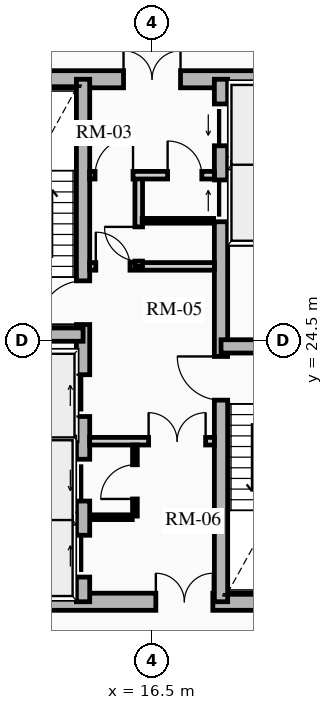
"""IFC4 building model, lengths in metres.
Left out: names, types, materials, properties, quantities, classifications, styles, units other than length and angle.
Written with IfcOpenShell. Run it as: python <this file> out.ifc"""

import sys

from ifc_helpers import new_model, si_unit, direction, frame, frame_2d, origin, place, context, subcontext, project, spatial, rectangle, extrude, source, transform, mapped, element, fill, save


model = new_model("IFC4")
c1 = context("Model", 3, precision=1e-05, world=origin(), true_north=direction((0.0, 1.0)))
c2 = subcontext(c1, "Body", "Model", "MODEL_VIEW")
j1 = project(units=[si_unit("LENGTHUNIT", "METRE"), si_unit("PLANEANGLEUNIT", "RADIAN")], contexts=[c1])
p1 = place(None, origin())
s1 = spatial("IfcSite", under=j1, at=p1, CompositionType="ELEMENT")
p2 = place(p1, origin())
s2 = spatial("IfcBuilding", under=s1, at=p2, CompositionType="ELEMENT")
p3 = place(p2, frame((0.0, 0.0, 129.16)))
s3 = spatial("IfcBuildingStorey", under=s2, at=p3, CompositionType="ELEMENT", Elevation=129.16)
p4 = place(p3, frame((11.15, 17.625, 0.0), z_axis=(0.0, 0.0, 1.0), x_axis=(1.0, 0.0, 0.0)))
e1 = element("IfcWall", 1, at=p4, inside=s3, PredefinedType="SHEAR", context=c2, shape_type="SweptSolid", body=[
    extrude(rectangle(XDim=10.7, YDim=0.45, at=frame_2d((5.35, 0.0))), origin(), (0.0, 0.0, 1.0), 3.72),
])
m1 = source(origin(), c2, "Body", "SweptSolid", [
    extrude(rectangle(XDim=1.5, YDim=2.02, at=frame_2d((0.75, 1.01))), frame((0.0, 0.235, 0.0), z_axis=(0.0, -1.0, 0.0), x_axis=(1.0, 0.0, 0.0)), (0.0, 0.0, 1.0), 0.47),
])
p5 = place(p4, frame((5.45, 0.0, 0.0)))
e2 = element("IfcOpeningElement", 2, at=p5, cuts=e1, PredefinedType="OPENING", context=c2, shape_type="MappedRepresentation", body=[
    mapped(m1, transform((0.0, 0.0, 0.0), x_axis=(1.0, 0.0, 0.0), y_axis=(0.0, 1.0, 0.0), z_axis=(0.0, 0.0, 1.0), scale=1.0)),
])
p6 = place(p3, frame((11.15, 31.375, 0.0), z_axis=(0.0, 0.0, 1.0), x_axis=(1.0, 0.0, 0.0)))
e3 = element("IfcWall", 3, at=p6, inside=s3, PredefinedType="SHEAR", context=c2, shape_type="SweptSolid", body=[
    extrude(rectangle(XDim=10.7, YDim=0.45, at=frame_2d((5.35, 0.0))), origin(), (0.0, 0.0, 1.0), 3.72),
])
p7 = place(p6, frame((4.6, 0.0, 0.0)))
e4 = element("IfcOpeningElement", 4, at=p7, cuts=e3, PredefinedType="OPENING", context=c2, shape_type="MappedRepresentation", body=[
    mapped(m1, transform((0.0, 0.0, 0.0), x_axis=(1.0, 0.0, 0.0), y_axis=(0.0, 1.0, 0.0), z_axis=(0.0, 0.0, 1.0), scale=1.0)),
])
p8 = place(p3, frame((14.685, 17.625, 0.0), z_axis=(0.0, 0.0, 1.0), x_axis=(0.0, 1.0, 0.0)))
e5 = element("IfcWall", 5, at=p8, inside=s3, PredefinedType="SHEAR", context=c2, shape_type="SweptSolid", body=[
    extrude(rectangle(XDim=13.75, YDim=0.35, at=frame_2d((6.875, 0.0))), origin(), (0.0, 0.0, 1.0), 3.72),
])
m2 = source(origin(), c2, "Body", "SweptSolid", [
    extrude(rectangle(XDim=1.1, YDim=2.015, at=frame_2d((0.55, 1.007))), frame((0.0, 0.185, 0.0), z_axis=(0.0, -1.0, 0.0), x_axis=(1.0, 0.0, 0.0)), (0.0, 0.0, 1.0), 0.37),
])
p9 = place(p8, frame((4.875, 0.0, 0.0)))
e6 = element("IfcOpeningElement", 6, at=p9, cuts=e5, PredefinedType="OPENING", context=c2, shape_type="MappedRepresentation", body=[
    mapped(m2, transform((0.0, 0.0, 0.0), x_axis=(1.0, 0.0, 0.0), y_axis=(0.0, 1.0, 0.0), z_axis=(0.0, 0.0, 1.0), scale=1.0)),
])
p10 = place(p8, frame((0.65, 0.0, 0.0)))
e7 = element("IfcOpeningElement", 7, at=p10, cuts=e5, PredefinedType="OPENING", context=c2, shape_type="MappedRepresentation", body=[
    mapped(m2, transform((0.0, 0.0, 0.0), x_axis=(1.0, 0.0, 0.0), y_axis=(0.0, 1.0, 0.0), z_axis=(0.0, 0.0, 1.0), scale=1.0)),
])
p11 = place(p8, frame((2.65, 0.0, 0.0)))
e8 = element("IfcOpeningElement", 8, at=p11, cuts=e5, PredefinedType="OPENING", context=c2, shape_type="MappedRepresentation", body=[
    mapped(m2, transform((0.0, 0.0, 0.0), x_axis=(1.0, 0.0, 0.0), y_axis=(0.0, 1.0, 0.0), z_axis=(0.0, 0.0, 1.0), scale=1.0)),
])
m3 = source(origin(), c2, "Body", "SweptSolid", [
    extrude(rectangle(XDim=1.15, YDim=2.02, at=frame_2d((0.575, 1.01))), frame((0.0, 0.185, 0.0), z_axis=(0.0, -1.0, 0.0), x_axis=(1.0, 0.0, 0.0)), (0.0, 0.0, 1.0), 0.37),
])
p12 = place(p8, frame((7.295, 0.0, 0.0)))
e9 = element("IfcOpeningElement", 9, at=p12, cuts=e5, PredefinedType="OPENING", context=c2, shape_type="MappedRepresentation", body=[
    mapped(m3, transform((0.0, 0.0, 0.0), x_axis=(1.0, 0.0, 0.0), y_axis=(0.0, 1.0, 0.0), z_axis=(0.0, 0.0, 1.0), scale=1.0)),
])
p13 = place(p3, frame((18.315, 17.625, 0.0), z_axis=(0.0, 0.0, 1.0), x_axis=(0.0, 1.0, 0.0)))
e10 = element("IfcWall", 10, at=p13, inside=s3, PredefinedType="SHEAR", context=c2, shape_type="SweptSolid", body=[
    extrude(rectangle(XDim=13.75, YDim=0.35, at=frame_2d((6.875, 0.0))), origin(), (0.0, 0.0, 1.0), 3.72),
])
p14 = place(p13, frame((10.0, 0.0, 0.0)))
e11 = element("IfcOpeningElement", 11, at=p14, cuts=e10, PredefinedType="OPENING", context=c2, shape_type="MappedRepresentation", body=[
    mapped(m2, transform((0.0, 0.0, 0.0), x_axis=(1.0, 0.0, 0.0), y_axis=(0.0, 1.0, 0.0), z_axis=(0.0, 0.0, 1.0), scale=1.0)),
])
p15 = place(p13, frame((12.0, 0.0, 0.0)))
e12 = element("IfcOpeningElement", 12, at=p15, cuts=e10, PredefinedType="OPENING", context=c2, shape_type="MappedRepresentation", body=[
    mapped(m2, transform((0.0, 0.0, 0.0), x_axis=(1.0, 0.0, 0.0), y_axis=(0.0, 1.0, 0.0), z_axis=(0.0, 0.0, 1.0), scale=1.0)),
])
p16 = place(p13, frame((5.305, 0.0, 0.0)))
e13 = element("IfcOpeningElement", 13, at=p16, cuts=e10, PredefinedType="OPENING", context=c2, shape_type="MappedRepresentation", body=[
    mapped(m3, transform((0.0, 0.0, 0.0), x_axis=(1.0, 0.0, 0.0), y_axis=(0.0, 1.0, 0.0), z_axis=(0.0, 0.0, 1.0), scale=1.0)),
])
for number, where, z_axis, x_axis in (
    (14, (11.4, 24.655, 0.0), (0.0, 0.0, 1.0), (1.0, 0.0, 0.0)),
    (15, (18.315, 24.345, 0.0), (0.0, 0.0, 1.0), (1.0, 0.0, 0.0)),
):
    element("IfcWall", number, at=place(p3, frame(where, z_axis=z_axis, x_axis=x_axis)), inside=s3, PredefinedType="SHEAR", context=c2, shape_type="SweptSolid", body=[
        extrude(rectangle(XDim=3.285, YDim=0.35, at=frame_2d((1.643, 0.0))), origin(), (0.0, 0.0, 1.0), 3.72),
    ])
for number, where, z_axis, x_axis in (
    (16, (11.52, 21.8, 0.0), (0.0, 0.0, 1.0), (1.0, 0.0, 0.0)),
    (17, (11.52, 19.825, 0.0), (0.0, 0.0, 1.0), (1.0, 0.0, 0.0)),
    (18, (18.51, 27.13, 0.0), (0.0, 0.0, 1.0), (1.0, 0.0, 0.0)),
    (19, (18.51, 29.175, 0.0), (0.0, 0.0, 1.0), (1.0, 0.0, 0.0)),
):
    element("IfcWall", number, at=place(p3, frame(where, z_axis=z_axis, x_axis=x_axis)), inside=s3, PredefinedType="SHEAR", context=c2, shape_type="SweptSolid", body=[
        extrude(rectangle(XDim=2.97, YDim=0.2, at=frame_2d((1.485, 0.0))), origin(), (0.0, 0.0, 1.0), 3.72),
    ])
p17 = place(p3, frame((14.86, 21.85, 0.0), z_axis=(0.0, 0.0, 1.0), x_axis=(1.0, 0.0, 0.0)))
e20 = element("IfcWall", 20, at=p17, inside=s3, PredefinedType="PARTITIONING", context=c2, shape_type="SweptSolid", body=[
    extrude(rectangle(XDim=3.28, YDim=0.2, at=frame_2d((1.64, 0.0))), origin(), (0.0, 0.0, 1.0), 3.425),
])
m4 = source(origin(), c2, "Body", "SweptSolid", [
    extrude(rectangle(XDim=1.5, YDim=2.02, at=frame_2d((0.75, 1.01))), frame((0.0, 0.11, 0.0), z_axis=(0.0, -1.0, 0.0), x_axis=(1.0, 0.0, 0.0)), (0.0, 0.0, 1.0), 0.22),
])
p18 = place(p17, frame((1.55, 0.0, 0.0)))
e21 = element("IfcOpeningElement", 21, at=p18, cuts=e20, PredefinedType="OPENING", context=c2, shape_type="MappedRepresentation", body=[
    mapped(m4, transform((0.0, 0.0, 0.0), x_axis=(1.0, 0.0, 0.0), y_axis=(0.0, 1.0, 0.0), z_axis=(0.0, 0.0, 1.0), scale=1.0)),
])
p19 = place(p3, frame((14.86, 26.45, 0.0), z_axis=(0.0, 0.0, 1.0), x_axis=(1.0, 0.0, 0.0)))
e22 = element("IfcWall", 22, at=p19, inside=s3, PredefinedType="PARTITIONING", context=c2, shape_type="SweptSolid", body=[
    extrude(rectangle(XDim=3.28, YDim=0.2, at=frame_2d((1.64, 0.0))), origin(), (0.0, 0.0, 1.0), 3.425),
])
m5 = source(origin(), c2, "Body", "SweptSolid", [
    extrude(rectangle(XDim=0.9, YDim=2.005, at=frame_2d((0.45, 1.002))), frame((0.0, 0.11, 0.0), z_axis=(0.0, -1.0, 0.0), x_axis=(1.0, 0.0, 0.0)), (0.0, 0.0, 1.0), 0.22),
])
p20 = place(p19, frame((0.16, 0.0, 0.0)))
e23 = element("IfcOpeningElement", 23, at=p20, cuts=e22, PredefinedType="OPENING", context=c2, shape_type="MappedRepresentation", body=[
    mapped(m5, transform((0.0, 0.0, 0.0), x_axis=(1.0, 0.0, 0.0), y_axis=(0.0, 1.0, 0.0), z_axis=(0.0, 0.0, 1.0), scale=1.0)),
])
p21 = place(p3, frame((16.15, 26.45, 0.0), z_axis=(0.0, 0.0, 1.0), x_axis=(0.0, 1.0, 0.0)))
e24 = element("IfcWall", 24, at=p21, inside=s3, PredefinedType="PARTITIONING", context=c2, shape_type="SweptSolid", body=[
    extrude(rectangle(XDim=2.4, YDim=0.2, at=frame_2d((1.2, 0.0))), origin(), (0.0, 0.0, 1.0), 3.425),
])
p22 = place(p21, frame((0.14, 0.0, 0.0)))
e25 = element("IfcOpeningElement", 25, at=p22, cuts=e24, PredefinedType="OPENING", context=c2, shape_type="MappedRepresentation", body=[
    mapped(m5, transform((0.0, 0.0, 0.0), x_axis=(1.0, 0.0, 0.0), y_axis=(0.0, 1.0, 0.0), z_axis=(0.0, 0.0, 1.0), scale=1.0)),
])
p23 = place(p3, frame((14.86, 28.85, 0.0), z_axis=(0.0, 0.0, 1.0), x_axis=(1.0, 0.0, 0.0)))
e26 = element("IfcWall", 26, at=p23, inside=s3, PredefinedType="PARTITIONING", context=c2, shape_type="SweptSolid", body=[
    extrude(rectangle(XDim=3.28, YDim=0.2, at=frame_2d((1.64, 0.0))), origin(), (0.0, 0.0, 1.0), 3.425),
])
m6 = source(origin(), c2, "Body", "SweptSolid", [
    extrude(rectangle(XDim=1.0, YDim=2.015, at=frame_2d((0.5, 1.007))), frame((0.0, 0.11, 0.0), z_axis=(0.0, -1.0, 0.0), x_axis=(1.0, 0.0, 0.0)), (0.0, 0.0, 1.0), 0.22),
])
p24 = place(p23, frame((0.14, 0.0, 0.0)))
e27 = element("IfcOpeningElement", 27, at=p24, cuts=e26, PredefinedType="OPENING", context=c2, shape_type="MappedRepresentation", body=[
    mapped(m6, transform((0.0, 0.0, 0.0), x_axis=(1.0, 0.0, 0.0), y_axis=(0.0, 1.0, 0.0), z_axis=(0.0, 0.0, 1.0), scale=1.0)),
])
p25 = place(p23, frame((2.05, 0.0, 0.0)))
e28 = element("IfcOpeningElement", 28, at=p25, cuts=e26, PredefinedType="OPENING", context=c2, shape_type="MappedRepresentation", body=[
    mapped(m5, transform((0.0, 0.0, 0.0), x_axis=(1.0, 0.0, 0.0), y_axis=(0.0, 1.0, 0.0), z_axis=(0.0, 0.0, 1.0), scale=1.0)),
])
p26 = place(p3, frame((16.05, 19.88, 0.0), z_axis=(0.0, 0.0, 1.0), x_axis=(0.0, 1.0, 0.0)))
e29 = element("IfcWall", 29, at=p26, inside=s3, PredefinedType="PARTITIONING", context=c2, shape_type="SweptSolid", body=[
    extrude(rectangle(XDim=1.87, YDim=0.125, at=frame_2d((0.935, 0.0))), origin(), (0.0, 0.0, 1.0), 3.425),
])
m7 = source(origin(), c2, "Body", "SweptSolid", [
    extrude(rectangle(XDim=0.9, YDim=2.005, at=frame_2d((0.45, 1.002))), frame((0.0, 0.073, 0.0), z_axis=(0.0, -1.0, 0.0), x_axis=(1.0, 0.0, 0.0)), (0.0, 0.0, 1.0), 0.145),
])
p27 = place(p26, frame((0.45, 0.0, 0.0)))
e30 = element("IfcOpeningElement", 30, at=p27, cuts=e29, PredefinedType="OPENING", context=c2, shape_type="MappedRepresentation", body=[
    mapped(m7, transform((0.0, 0.0, 0.0), x_axis=(1.0, 0.0, 0.0), y_axis=(0.0, 1.0, 0.0), z_axis=(0.0, 0.0, 1.0), scale=1.0)),
])
p28 = place(p3, frame((14.88, 19.85, 0.0), z_axis=(0.0, 0.0, 1.0), x_axis=(1.0, 0.0, 0.0)))
e31 = element("IfcWall", 31, at=p28, inside=s3, PredefinedType="PARTITIONING", context=c2, shape_type="SweptSolid", body=[
    extrude(rectangle(XDim=1.1, YDim=0.125, at=frame_2d((0.55, 0.0))), origin(), (0.0, 0.0, 1.0), 3.425),
])
p29 = place(p3, frame((16.24, 27.65, 0.0), z_axis=(0.0, 0.0, 1.0), x_axis=(1.0, 0.0, 0.0)))
e32 = element("IfcWall", 32, at=p29, inside=s3, PredefinedType="PARTITIONING", context=c2, shape_type="SweptSolid", body=[
    extrude(rectangle(XDim=1.88, YDim=0.125, at=frame_2d((0.94, 0.0))), origin(), (0.0, 0.0, 1.0), 3.425),
])
m8 = source(origin(), c2, "Body", "SweptSolid", [
    extrude(rectangle(XDim=1.1, YDim=2.015, at=frame_2d((0.55, 1.007))), frame((0.0, 0.025, 0.0), z_axis=(0.0, -1.0, 0.0), x_axis=(1.0, 0.0, 0.0)), (0.0, 0.0, 1.0), 0.05),
])
p30 = place(p9, origin())
e33 = element("IfcDoor", 33, at=p30, inside=s3, OperationType="SLIDING_TO_RIGHT", PredefinedType="DOOR", context=c2, shape_type="MappedRepresentation", body=[
    mapped(m8, transform((0.0, 0.0, 0.0), x_axis=(1.0, 0.0, 0.0), y_axis=(0.0, 1.0, 0.0), z_axis=(0.0, 0.0, 1.0), scale=1.0)),
])
fill(e6, e33)
p31 = place(p10, origin())
e34 = element("IfcDoor", 34, at=p31, inside=s3, OperationType="SLIDING_TO_RIGHT", PredefinedType="DOOR", context=c2, shape_type="MappedRepresentation", body=[
    mapped(m8, transform((0.0, 0.0, 0.0), x_axis=(1.0, 0.0, 0.0), y_axis=(0.0, 1.0, 0.0), z_axis=(0.0, 0.0, 1.0), scale=1.0)),
])
fill(e7, e34)
p32 = place(p11, origin())
e35 = element("IfcDoor", 35, at=p32, inside=s3, OperationType="SLIDING_TO_LEFT", PredefinedType="DOOR", context=c2, shape_type="MappedRepresentation", body=[
    mapped(m8, transform((0.0, 0.0, 0.0), x_axis=(1.0, 0.0, 0.0), y_axis=(0.0, 1.0, 0.0), z_axis=(0.0, 0.0, 1.0), scale=1.0)),
])
fill(e8, e35)
p33 = place(p14, origin())
e36 = element("IfcDoor", 36, at=p33, inside=s3, OperationType="SLIDING_TO_RIGHT", PredefinedType="DOOR", context=c2, shape_type="MappedRepresentation", body=[
    mapped(m8, transform((0.0, 0.0, 0.0), x_axis=(1.0, 0.0, 0.0), y_axis=(0.0, 1.0, 0.0), z_axis=(0.0, 0.0, 1.0), scale=1.0)),
])
fill(e11, e36)
p34 = place(p15, origin())
e37 = element("IfcDoor", 37, at=p34, inside=s3, OperationType="SLIDING_TO_LEFT", PredefinedType="DOOR", context=c2, shape_type="MappedRepresentation", body=[
    mapped(m8, transform((0.0, 0.0, 0.0), x_axis=(1.0, 0.0, 0.0), y_axis=(0.0, 1.0, 0.0), z_axis=(0.0, 0.0, 1.0), scale=1.0)),
])
fill(e12, e37)
m9 = source(origin(), c2, "Body", "SweptSolid", [
    extrude(rectangle(XDim=1.15, YDim=2.02, at=frame_2d((0.575, 1.01))), frame((0.0, 0.025, 0.0), z_axis=(0.0, -1.0, 0.0), x_axis=(1.0, 0.0, 0.0)), (0.0, 0.0, 1.0), 0.05),
])
p35 = place(p12, origin())
e38 = element("IfcDoor", 38, at=p35, inside=s3, OperationType="SINGLE_SWING_LEFT", PredefinedType="DOOR", context=c2, shape_type="MappedRepresentation", body=[
    mapped(m9, transform((0.0, 0.0, 0.0), x_axis=(1.0, 0.0, 0.0), y_axis=(0.0, 1.0, 0.0), z_axis=(0.0, 0.0, 1.0), scale=1.0)),
])
fill(e9, e38)
p36 = place(p16, origin())
e39 = element("IfcDoor", 39, at=p36, inside=s3, OperationType="SINGLE_SWING_RIGHT", PredefinedType="DOOR", context=c2, shape_type="MappedRepresentation", body=[
    mapped(m9, transform((0.0, 0.0, 0.0), x_axis=(1.0, 0.0, 0.0), y_axis=(0.0, 1.0, 0.0), z_axis=(0.0, 0.0, 1.0), scale=1.0)),
])
fill(e13, e39)
m10 = source(origin(), c2, "Body", "SweptSolid", [
    extrude(rectangle(XDim=1.5, YDim=2.02, at=frame_2d((0.75, 1.01))), frame((0.0, 0.025, 0.0), z_axis=(0.0, -1.0, 0.0), x_axis=(1.0, 0.0, 0.0)), (0.0, 0.0, 1.0), 0.05),
])
p37 = place(p7, origin())
e40 = element("IfcDoor", 40, at=p37, inside=s3, OperationType="DOUBLE_DOOR_SINGLE_SWING", PredefinedType="DOOR", context=c2, shape_type="MappedRepresentation", body=[
    mapped(m10, transform((0.0, 0.0, 0.0), x_axis=(1.0, 0.0, 0.0), y_axis=(0.0, 1.0, 0.0), z_axis=(0.0, 0.0, 1.0), scale=1.0)),
])
fill(e4, e40)
p38 = place(p5, origin())
e41 = element("IfcDoor", 41, at=p38, inside=s3, OperationType="DOUBLE_DOOR_SINGLE_SWING", PredefinedType="DOOR", context=c2, shape_type="MappedRepresentation", body=[
    mapped(m10, transform((0.0, 0.0, 0.0), x_axis=(1.0, 0.0, 0.0), y_axis=(0.0, 1.0, 0.0), z_axis=(0.0, 0.0, 1.0), scale=1.0)),
])
fill(e2, e41)
p39 = place(p18, origin())
e42 = element("IfcDoor", 42, at=p39, inside=s3, OperationType="DOUBLE_DOOR_SINGLE_SWING", PredefinedType="DOOR", context=c2, shape_type="MappedRepresentation", body=[
    mapped(m10, transform((0.0, 0.0, 0.0), x_axis=(1.0, 0.0, 0.0), y_axis=(0.0, 1.0, 0.0), z_axis=(0.0, 0.0, 1.0), scale=1.0)),
])
fill(e21, e42)
m11 = source(origin(), c2, "Body", "SweptSolid", [
    extrude(rectangle(XDim=0.9, YDim=2.005, at=frame_2d((0.45, 1.002))), frame((0.0, 0.025, 0.0), z_axis=(0.0, -1.0, 0.0), x_axis=(1.0, 0.0, 0.0)), (0.0, 0.0, 1.0), 0.05),
])
p40 = place(p20, origin())
e43 = element("IfcDoor", 43, at=p40, inside=s3, OperationType="SINGLE_SWING_LEFT", PredefinedType="DOOR", context=c2, shape_type="MappedRepresentation", body=[
    mapped(m11, transform((0.0, 0.0, 0.0), x_axis=(1.0, 0.0, 0.0), y_axis=(0.0, 1.0, 0.0), z_axis=(0.0, 0.0, 1.0), scale=1.0)),
])
fill(e23, e43)
m12 = source(origin(), c2, "Body", "SweptSolid", [
    extrude(rectangle(XDim=1.0, YDim=2.015, at=frame_2d((0.5, 1.007))), frame((0.0, 0.025, 0.0), z_axis=(0.0, -1.0, 0.0), x_axis=(1.0, 0.0, 0.0)), (0.0, 0.0, 1.0), 0.05),
])
p41 = place(p24, origin())
e44 = element("IfcDoor", 44, at=p41, inside=s3, OperationType="SINGLE_SWING_RIGHT", PredefinedType="DOOR", context=c2, shape_type="MappedRepresentation", body=[
    mapped(m12, transform((0.0, 0.0, 0.0), x_axis=(1.0, 0.0, 0.0), y_axis=(0.0, 1.0, 0.0), z_axis=(0.0, 0.0, 1.0), scale=1.0)),
])
fill(e27, e44)
p42 = place(p27, origin())
e45 = element("IfcDoor", 45, at=p42, inside=s3, OperationType="SINGLE_SWING_LEFT", PredefinedType="DOOR", context=c2, shape_type="MappedRepresentation", body=[
    mapped(m11, transform((0.0, 0.0, 0.0), x_axis=(1.0, 0.0, 0.0), y_axis=(0.0, 1.0, 0.0), z_axis=(0.0, 0.0, 1.0), scale=1.0)),
])
fill(e30, e45)
p43 = place(p22, origin())
e46 = element("IfcDoor", 46, at=p43, inside=s3, OperationType="SINGLE_SWING_RIGHT", PredefinedType="DOOR", context=c2, shape_type="MappedRepresentation", body=[
    mapped(m11, transform((0.0, 0.0, 0.0), x_axis=(1.0, 0.0, 0.0), y_axis=(0.0, 1.0, 0.0), z_axis=(0.0, 0.0, 1.0), scale=1.0)),
])
fill(e25, e46)
p44 = place(p25, origin())
e47 = element("IfcDoor", 47, at=p44, inside=s3, OperationType="SINGLE_SWING_LEFT", PredefinedType="DOOR", context=c2, shape_type="MappedRepresentation", body=[
    mapped(m11, transform((0.0, 0.0, 0.0), x_axis=(1.0, 0.0, 0.0), y_axis=(0.0, 1.0, 0.0), z_axis=(0.0, 0.0, 1.0), scale=1.0)),
])
fill(e28, e47)
save(model, sys.argv[1])
